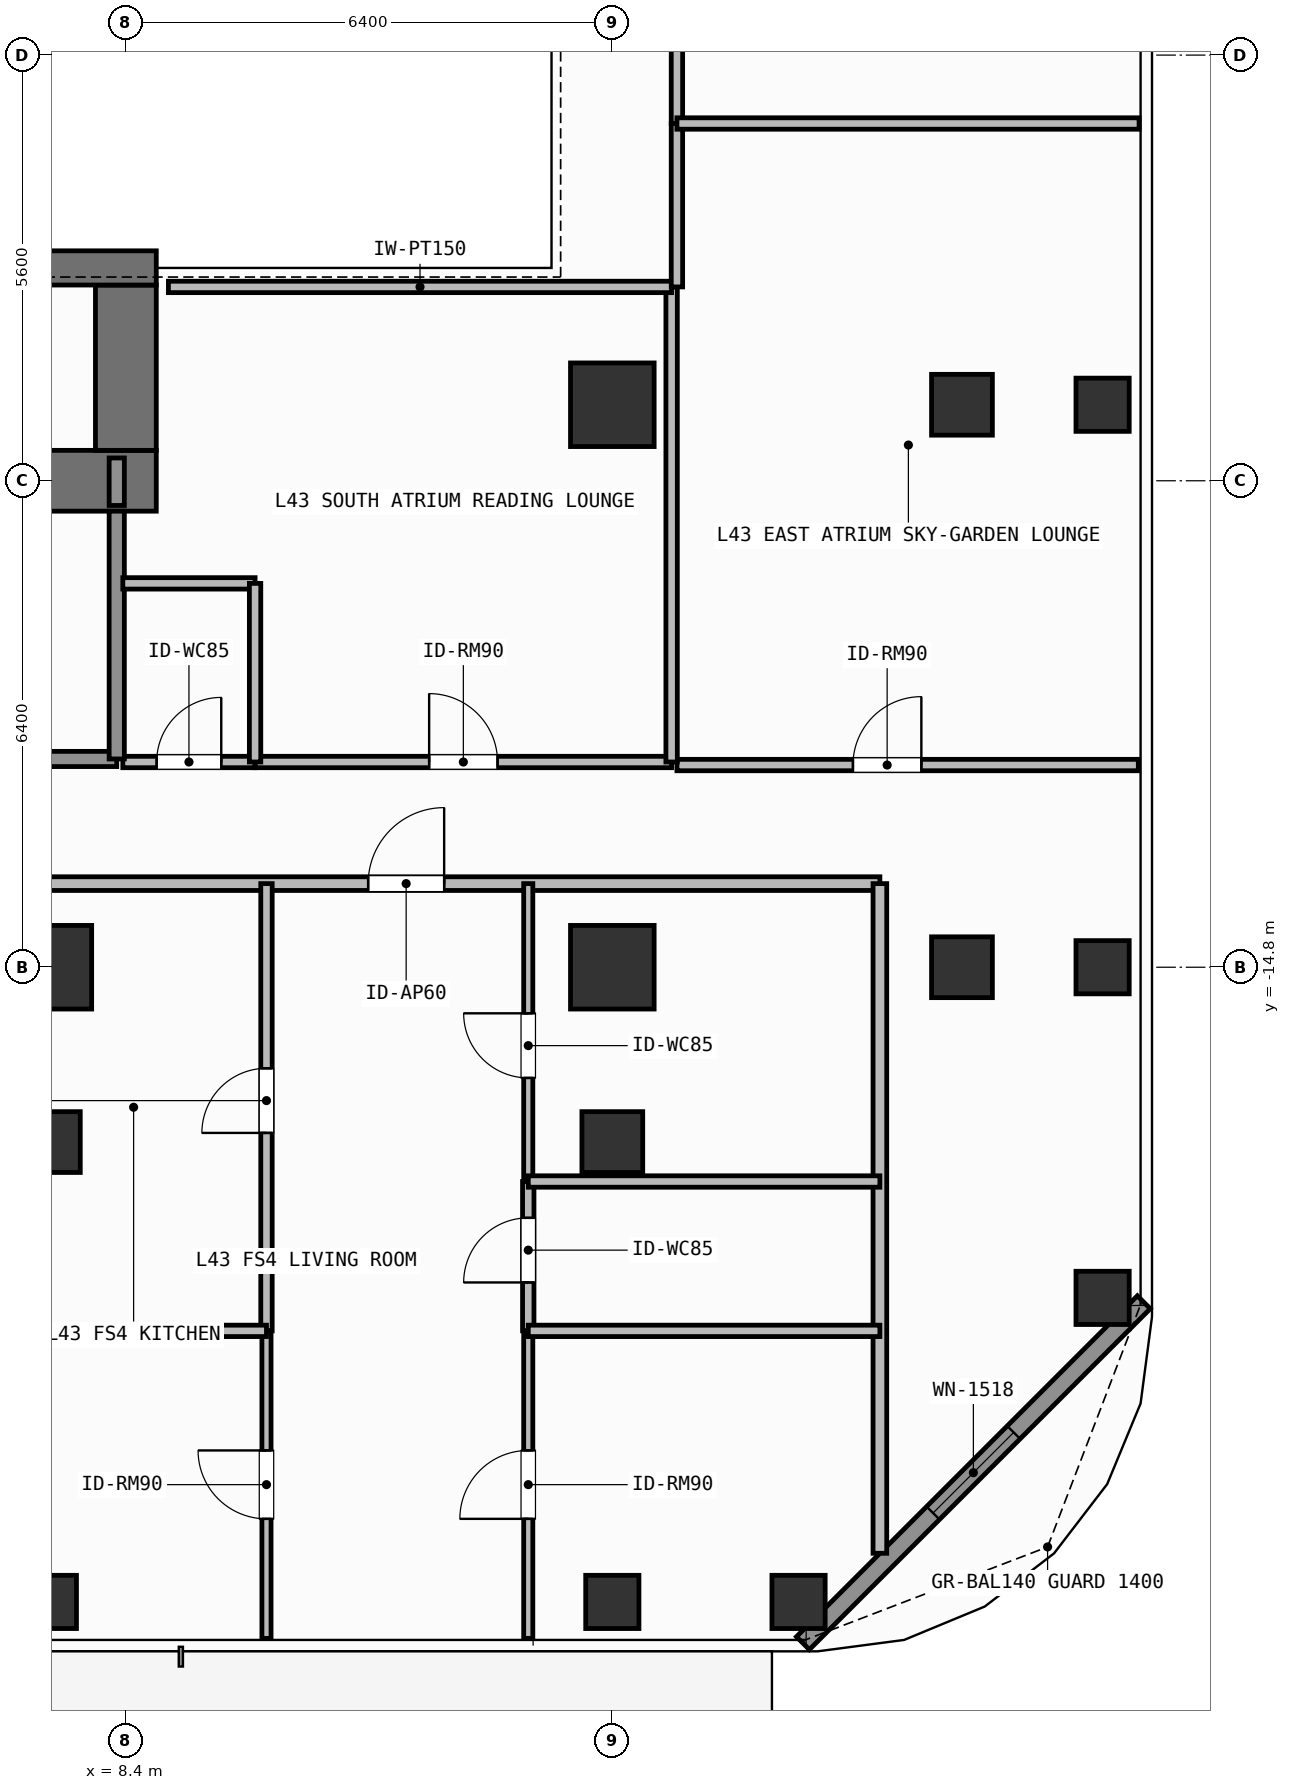
"""IFC4 building model, lengths in metres.
Left out: names, types, materials, properties, quantities, classifications, styles, units other than length and angle.
Written with IfcOpenShell. Run it as: python <this file> out.ifc"""

import sys

from ifc_helpers import new_model, si_unit, direction, frame, frame_2d, origin, origin_2d, place, context, subcontext, project, spatial, rectangle, hollow_rectangle, extrude, element, fill, save


model = new_model("IFC4")
c1 = context("Model", 3, precision=1e-05, world=origin(), true_north=direction((0.0, 1.0)))
c2 = subcontext(c1, "Body", "Model", "MODEL_VIEW")
j1 = project(units=[si_unit("LENGTHUNIT", "METRE"), si_unit("PLANEANGLEUNIT", "RADIAN")], contexts=[c1])
p1 = place(None, origin())
s1 = spatial("IfcSite", under=j1, at=p1, CompositionType="ELEMENT")
p2 = place(p1, origin())
s2 = spatial("IfcBuilding", under=s1, at=p2, CompositionType="ELEMENT")
p3 = place(p2, frame((0.0, 0.0, 175.8)))
s3 = spatial("IfcBuildingStorey", under=s2, at=p3, CompositionType="ELEMENT", Elevation=175.8)
p4 = place(p3, frame((6.12, -8.4, 0.0), z_axis=(0.0, 0.0, 1.0), x_axis=(1.0, 0.0, 0.0)))
e1 = element("IfcWall", 1, at=p4, inside=s3, PredefinedType="SHEAR", context=c2, shape_type="SweptSolid", body=[
    extrude(rectangle(XDim=2.68, YDim=0.8, at=frame_2d((1.34, 0.0))), origin(), (0.0, 0.0, 1.0), 3.9),
])
p5 = place(p3, frame((8.4, -8.0, 0.0), z_axis=(0.0, 0.0, 1.0), x_axis=(0.0, 1.0, 0.0)))
e2 = element("IfcWall", 2, at=p5, inside=s3, PredefinedType="SHEAR", context=c2, shape_type="SweptSolid", body=[
    extrude(rectangle(XDim=2.175, YDim=0.8, at=frame_2d((1.087, 0.0))), origin(), (0.0, 0.0, 1.0), 3.9),
])
p6 = place(p3, frame((3.045, -5.6, 0.0), z_axis=(0.0, 0.0, 1.0), x_axis=(1.0, 0.0, 0.0)))
e3 = element("IfcWall", 3, at=p6, inside=s3, PredefinedType="SHEAR", context=c2, shape_type="SweptSolid", body=[
    extrude(rectangle(XDim=5.755, YDim=0.45, at=frame_2d((2.877, 0.0))), origin(), (0.0, 0.0, 1.0), 3.9),
])
for number, where, z_axis, x_axis in (
    (4, (7.4, -14.8, 0.0), (0.0, 0.0, 1.0), (1.0, 0.0, 0.0)),
    (5, (14.8, -14.8, 0.0), (0.0, 0.0, 1.0), (1.0, 0.0, 0.0)),
    (6, (14.8, -7.4, 0.0), (0.0, 0.0, 1.0), (1.0, 0.0, 0.0)),
):
    element("IfcColumn", number, at=place(p3, frame(where, z_axis=z_axis, x_axis=x_axis)), inside=s3, PredefinedType="COLUMN", context=c2, shape_type="SweptSolid", body=[
        extrude(rectangle(XDim=1.1, YDim=1.1, at=origin_2d()), origin(), (0.0, 0.0, 1.0), 3.9),
    ])
for number, where, z_axis, x_axis in (
    (7, (19.4, -14.8, 0.0), (0.0, 0.0, 1.0), (1.0, 0.0, 0.0)),
    (8, (19.4, -7.4, 0.0), (0.0, 0.0, 1.0), (1.0, 0.0, 0.0)),
    (9, (7.4, -17.1, 0.0), (0.0, 0.0, 1.0), (1.0, 0.0, 0.0)),
    (10, (14.8, -17.1, 0.0), (0.0, 0.0, 1.0), (1.0, 0.0, 0.0)),
):
    element("IfcColumn", number, at=place(p3, frame(where, z_axis=z_axis, x_axis=x_axis)), inside=s3, PredefinedType="COLUMN", context=c2, shape_type="SweptSolid", body=[
        extrude(hollow_rectangle(XDim=0.8, YDim=0.8, WallThickness=0.036, at=origin_2d()), origin(), (0.0, 0.0, 1.0), 3.9),
    ])
for number, where, z_axis, x_axis in (
    (11, (17.25, -23.15, 0.0), (0.0, 0.0, 1.0), (1.0, 0.0, 0.0)),
    (12, (21.25, -19.15, 0.0), (0.0, 0.0, 1.0), (1.0, 0.0, 0.0)),
    (13, (7.4, -23.15, 0.0), (0.0, 0.0, 1.0), (1.0, 0.0, 0.0)),
    (14, (14.8, -23.15, 0.0), (0.0, 0.0, 1.0), (1.0, 0.0, 0.0)),
    (15, (21.25, -14.8, 0.0), (0.0, 0.0, 1.0), (1.0, 0.0, 0.0)),
    (16, (21.25, -7.4, 0.0), (0.0, 0.0, 1.0), (1.0, 0.0, 0.0)),
):
    element("IfcColumn", number, at=place(p3, frame(where, z_axis=z_axis, x_axis=x_axis)), inside=s3, PredefinedType="COLUMN", context=c2, shape_type="SweptSolid", body=[
        extrude(hollow_rectangle(XDim=0.7, YDim=0.7, WallThickness=0.032, at=origin_2d()), origin(), (0.0, 0.0, 1.0), 3.9),
    ])
p7 = place(p3, frame((21.792, -19.208, 0.0), z_axis=(0.0, 0.0, 1.0), x_axis=(-0.707106781187, -0.707106781187, 0.0)))
e17 = element("IfcWall", 17, at=p7, inside=s3, PredefinedType="SOLIDWALL", context=c2, shape_type="SweptSolid", body=[
    extrude(rectangle(XDim=6.343, YDim=0.24, at=frame_2d((3.171, 0.0))), origin(), (0.0, 0.0, 1.0), 3.68),
])
p8 = place(p7, frame((2.421, 0.0, 0.8)))
e18 = element("IfcOpeningElement", 18, at=p8, cuts=e17, PredefinedType="OPENING", context=c2, shape_type="SweptSolid", body=[
    extrude(rectangle(XDim=1.5, YDim=1.85, at=frame_2d((0.75, 0.925))), frame((0.0, 0.13, 0.0), z_axis=(0.0, -1.0, 0.0), x_axis=(1.0, 0.0, 0.0)), (0.0, 0.0, 1.0), 0.26),
])
p9 = place(p3, frame((4.58, -12.06, 0.0), z_axis=(0.0, 0.0, 1.0), x_axis=(1.0, 0.0, 0.0)))
e19 = element("IfcWall", 19, at=p9, inside=s3, PredefinedType="SOLIDWALL", context=c2, shape_type="SweptSolid", body=[
    extrude(rectangle(XDim=3.7, YDim=0.2, at=frame_2d((1.85, 0.0))), origin(), (0.0, 0.0, 1.0), 3.68),
])
p10 = place(p9, frame((1.212, 0.0, 0.0)))
e20 = element("IfcOpeningElement", 20, at=p10, cuts=e19, PredefinedType="OPENING", context=c2, shape_type="SweptSolid", body=[
    extrude(rectangle(XDim=1.1, YDim=2.15, at=frame_2d((0.55, 1.075))), frame((0.0, 0.11, 0.0), z_axis=(0.0, -1.0, 0.0), x_axis=(1.0, 0.0, 0.0)), (0.0, 0.0, 1.0), 0.22),
])
p11 = place(p3, frame((8.36, -12.1, 0.0), z_axis=(0.0, 0.0, 1.0), x_axis=(1.0, 0.0, 0.0)))
e21 = element("IfcWall", 21, at=p11, inside=s3, PredefinedType="PARTITIONING", context=c2, shape_type="SweptSolid", body=[
    extrude(rectangle(XDim=1.74, YDim=0.15, at=frame_2d((0.87, 0.0))), origin(), (0.0, 0.0, 1.0), 3.68),
])
p12 = place(p11, frame((0.445, 0.0, 0.0)))
e22 = element("IfcOpeningElement", 22, at=p12, cuts=e21, PredefinedType="OPENING", context=c2, shape_type="SweptSolid", body=[
    extrude(rectangle(XDim=0.85, YDim=2.1, at=frame_2d((0.425, 1.05))), frame((0.0, 0.085, 0.0), z_axis=(0.0, -1.0, 0.0), x_axis=(1.0, 0.0, 0.0)), (0.0, 0.0, 1.0), 0.17),
])
p13 = place(p3, frame((10.1, -12.1, 0.0), z_axis=(0.0, 0.0, 1.0), x_axis=(1.0, 0.0, 0.0)))
e23 = element("IfcWall", 23, at=p13, inside=s3, PredefinedType="PARTITIONING", context=c2, shape_type="SweptSolid", body=[
    extrude(rectangle(XDim=5.48, YDim=0.15, at=frame_2d((2.74, 0.0))), origin(), (0.0, 0.0, 1.0), 3.68),
])
p14 = place(p13, frame((2.29, 0.0, 0.0)))
e24 = element("IfcOpeningElement", 24, at=p14, cuts=e23, PredefinedType="OPENING", context=c2, shape_type="SweptSolid", body=[
    extrude(rectangle(XDim=0.9, YDim=2.1, at=frame_2d((0.45, 1.05))), frame((0.0, 0.085, 0.0), z_axis=(0.0, -1.0, 0.0), x_axis=(1.0, 0.0, 0.0)), (0.0, 0.0, 1.0), 0.17),
])
p15 = place(p3, frame((6.754, -13.7, 0.0), z_axis=(0.0, 0.0, 1.0), x_axis=(1.0, 0.0, 0.0)))
e25 = element("IfcWall", 25, at=p15, inside=s3, PredefinedType="PARTITIONING", context=c2, shape_type="SweptSolid", body=[
    extrude(rectangle(XDim=11.566, YDim=0.18, at=frame_2d((5.783, 0.0))), origin(), (0.0, 0.0, 1.0), 3.68),
])
p16 = place(p15, frame((4.833, 0.0, 0.0)))
e26 = element("IfcOpeningElement", 26, at=p16, cuts=e25, PredefinedType="OPENING", context=c2, shape_type="SweptSolid", body=[
    extrude(rectangle(XDim=1.0, YDim=2.2, at=frame_2d((0.5, 1.1))), frame((0.0, 0.1, 0.0), z_axis=(0.0, -1.0, 0.0), x_axis=(1.0, 0.0, 0.0)), (0.0, 0.0, 1.0), 0.2),
])
p17 = place(p3, frame((10.25, -19.584, 0.0), z_axis=(0.0, 0.0, 1.0), x_axis=(0.0, 1.0, 0.0)))
e27 = element("IfcWall", 27, at=p17, inside=s3, PredefinedType="PARTITIONING", context=c2, shape_type="SweptSolid", body=[
    extrude(rectangle(XDim=5.884, YDim=0.15, at=frame_2d((2.942, 0.0))), origin(), (0.0, 0.0, 1.0), 3.68),
])
p18 = place(p17, frame((2.604, 0.0, 0.0)))
e28 = element("IfcOpeningElement", 28, at=p18, cuts=e27, PredefinedType="OPENING", context=c2, shape_type="SweptSolid", body=[
    extrude(rectangle(XDim=0.85, YDim=2.1, at=frame_2d((0.425, 1.05))), frame((0.0, 0.085, 0.0), z_axis=(0.0, -1.0, 0.0), x_axis=(1.0, 0.0, 0.0)), (0.0, 0.0, 1.0), 0.17),
])
p19 = place(p3, frame((10.25, -23.63, 0.0), z_axis=(0.0, 0.0, 1.0), x_axis=(0.0, 1.0, 0.0)))
e29 = element("IfcWall", 29, at=p19, inside=s3, PredefinedType="PARTITIONING", context=c2, shape_type="SweptSolid", body=[
    extrude(rectangle(XDim=4.046, YDim=0.12, at=frame_2d((2.023, 0.0))), origin(), (0.0, 0.0, 1.0), 3.68),
])
p20 = place(p19, frame((1.573, 0.0, 0.0)))
e30 = element("IfcOpeningElement", 30, at=p20, cuts=e29, PredefinedType="OPENING", context=c2, shape_type="SweptSolid", body=[
    extrude(rectangle(XDim=0.9, YDim=2.1, at=frame_2d((0.45, 1.05))), frame((0.0, 0.07, 0.0), z_axis=(0.0, -1.0, 0.0), x_axis=(1.0, 0.0, 0.0)), (0.0, 0.0, 1.0), 0.14),
])
p21 = place(p3, frame((13.694, -19.584, 0.0), z_axis=(0.0, 0.0, 1.0), x_axis=(0.0, 1.0, 0.0)))
e31 = element("IfcWall", 31, at=p21, inside=s3, PredefinedType="PARTITIONING", context=c2, shape_type="SweptSolid", body=[
    extrude(rectangle(XDim=1.965, YDim=0.15, at=frame_2d((0.982, 0.0))), origin(), (0.0, 0.0, 1.0), 3.68),
])
p22 = place(p21, frame((0.637, 0.0, 0.0)))
e32 = element("IfcOpeningElement", 32, at=p22, cuts=e31, PredefinedType="OPENING", context=c2, shape_type="SweptSolid", body=[
    extrude(rectangle(XDim=0.85, YDim=2.1, at=frame_2d((0.425, 1.05))), frame((0.0, 0.085, 0.0), z_axis=(0.0, -1.0, 0.0), x_axis=(1.0, 0.0, 0.0)), (0.0, 0.0, 1.0), 0.17),
])
p23 = place(p3, frame((13.694, -17.619, 0.0), z_axis=(0.0, 0.0, 1.0), x_axis=(0.0, 1.0, 0.0)))
e33 = element("IfcWall", 33, at=p23, inside=s3, PredefinedType="PARTITIONING", context=c2, shape_type="SweptSolid", body=[
    extrude(rectangle(XDim=3.919, YDim=0.12, at=frame_2d((1.959, 0.0))), origin(), (0.0, 0.0, 1.0), 3.68),
])
p24 = place(p23, frame((1.363, 0.0, 0.0)))
e34 = element("IfcOpeningElement", 34, at=p24, cuts=e33, PredefinedType="OPENING", context=c2, shape_type="SweptSolid", body=[
    extrude(rectangle(XDim=0.85, YDim=2.1, at=frame_2d((0.425, 1.05))), frame((0.0, 0.07, 0.0), z_axis=(0.0, -1.0, 0.0), x_axis=(1.0, 0.0, 0.0)), (0.0, 0.0, 1.0), 0.14),
])
p25 = place(p3, frame((13.694, -23.63, 0.0), z_axis=(0.0, 0.0, 1.0), x_axis=(0.0, 1.0, 0.0)))
e35 = element("IfcWall", 35, at=p25, inside=s3, PredefinedType="PARTITIONING", context=c2, shape_type="SweptSolid", body=[
    extrude(rectangle(XDim=4.046, YDim=0.12, at=frame_2d((2.023, 0.0))), origin(), (0.0, 0.0, 1.0), 3.68),
])
p26 = place(p25, frame((1.573, 0.0, 0.0)))
e36 = element("IfcOpeningElement", 36, at=p26, cuts=e35, PredefinedType="OPENING", context=c2, shape_type="SweptSolid", body=[
    extrude(rectangle(XDim=0.9, YDim=2.1, at=frame_2d((0.45, 1.05))), frame((0.0, 0.07, 0.0), z_axis=(0.0, -1.0, 0.0), x_axis=(1.0, 0.0, 0.0)), (0.0, 0.0, 1.0), 0.14),
])
p27 = place(p3, frame((15.65, -12.14, 0.0), z_axis=(0.0, 0.0, 1.0), x_axis=(1.0, 0.0, 0.0)))
e37 = element("IfcWall", 37, at=p27, inside=s3, PredefinedType="PARTITIONING", context=c2, shape_type="SweptSolid", body=[
    extrude(rectangle(XDim=6.07, YDim=0.15, at=frame_2d((3.035, 0.0))), origin(), (0.0, 0.0, 1.0), 3.68),
])
p28 = place(p27, frame((2.316, 0.0, 0.0)))
e38 = element("IfcOpeningElement", 38, at=p28, cuts=e37, PredefinedType="OPENING", context=c2, shape_type="SweptSolid", body=[
    extrude(rectangle(XDim=0.9, YDim=2.1, at=frame_2d((0.45, 1.05))), frame((0.0, 0.085, 0.0), z_axis=(0.0, -1.0, 0.0), x_axis=(1.0, 0.0, 0.0)), (0.0, 0.0, 1.0), 0.17),
])
p29 = place(p3, frame((8.28, -12.06, 0.0), z_axis=(0.0, 0.0, 1.0), x_axis=(0.0, 1.0, 0.0)))
e39 = element("IfcWall", 39, at=p29, inside=s3, PredefinedType="SOLIDWALL", context=c2, shape_type="SweptSolid", body=[
    extrude(rectangle(XDim=3.26, YDim=0.2, at=frame_2d((1.63, 0.0))), origin(), (0.0, 0.0, 1.0), 3.68),
])
p30 = place(p3, frame((8.28, -8.725, 0.0), z_axis=(0.0, 0.0, 1.0), x_axis=(0.0, 1.0, 0.0)))
e40 = element("IfcWall", 40, at=p30, inside=s3, PredefinedType="SOLIDWALL", context=c2, shape_type="SweptSolid", body=[
    extrude(rectangle(XDim=0.625, YDim=0.2, at=frame_2d((0.312, 0.0))), origin(), (0.0, 0.0, 1.0), 3.68),
])
p31 = place(p3, frame((8.36, -9.75, 0.0), z_axis=(0.0, 0.0, 1.0), x_axis=(1.0, 0.0, 0.0)))
e41 = element("IfcWall", 41, at=p31, inside=s3, PredefinedType="PARTITIONING", context=c2, shape_type="SweptSolid", body=[
    extrude(rectangle(XDim=1.74, YDim=0.15, at=frame_2d((0.87, 0.0))), origin(), (0.0, 0.0, 1.0), 3.68),
])
p32 = place(p3, frame((10.1, -12.1, 0.0), z_axis=(0.0, 0.0, 1.0), x_axis=(0.0, 1.0, 0.0)))
e42 = element("IfcWall", 42, at=p32, inside=s3, PredefinedType="PARTITIONING", context=c2, shape_type="SweptSolid", body=[
    extrude(rectangle(XDim=2.35, YDim=0.15, at=frame_2d((1.175, 0.0))), origin(), (0.0, 0.0, 1.0), 3.68),
])
p33 = place(p3, frame((15.58, -12.1, 0.0), z_axis=(0.0, 0.0, 1.0), x_axis=(0.0, 1.0, 0.0)))
e43 = element("IfcWall", 43, at=p33, inside=s3, PredefinedType="PARTITIONING", context=c2, shape_type="SweptSolid", body=[
    extrude(rectangle(XDim=6.25, YDim=0.15, at=frame_2d((3.125, 0.0))), origin(), (0.0, 0.0, 1.0), 3.68),
])
p34 = place(p3, frame((8.96, -5.85, 0.0), z_axis=(0.0, 0.0, 1.0), x_axis=(1.0, 0.0, 0.0)))
e44 = element("IfcWall", 44, at=p34, inside=s3, PredefinedType="PARTITIONING", context=c2, shape_type="SweptSolid", body=[
    extrude(rectangle(XDim=6.62, YDim=0.15, at=frame_2d((3.31, 0.0))), origin(), (0.0, 0.0, 1.0), 3.68),
])
p35 = place(p3, frame((18.32, -22.51, 0.0), z_axis=(0.0, 0.0, 1.0), x_axis=(0.0, 1.0, 0.0)))
e45 = element("IfcWall", 45, at=p35, inside=s3, PredefinedType="PARTITIONING", context=c2, shape_type="SweptSolid", body=[
    extrude(rectangle(XDim=8.81, YDim=0.18, at=frame_2d((4.405, 0.0))), origin(), (0.0, 0.0, 1.0), 3.68),
])
p36 = place(p3, frame((6.754, -19.584, 0.0), z_axis=(0.0, 0.0, 1.0), x_axis=(1.0, 0.0, 0.0)))
e46 = element("IfcWall", 46, at=p36, inside=s3, PredefinedType="PARTITIONING", context=c2, shape_type="SweptSolid", body=[
    extrude(rectangle(XDim=3.496, YDim=0.15, at=frame_2d((1.748, 0.0))), origin(), (0.0, 0.0, 1.0), 3.68),
])
for number, where, z_axis, x_axis in (
    (47, (13.694, -17.619, 0.0), (0.0, 0.0, 1.0), (1.0, 0.0, 0.0)),
    (48, (13.694, -19.584, 0.0), (0.0, 0.0, 1.0), (1.0, 0.0, 0.0)),
):
    element("IfcWall", number, at=place(p3, frame(where, z_axis=z_axis, x_axis=x_axis)), inside=s3, PredefinedType="PARTITIONING", context=c2, shape_type="SweptSolid", body=[
        extrude(rectangle(XDim=4.626, YDim=0.15, at=frame_2d((2.313, 0.0))), origin(), (0.0, 0.0, 1.0), 3.68),
    ])
p37 = place(p3, frame((15.65, -5.85, 0.0), z_axis=(0.0, 0.0, 1.0), x_axis=(0.0, 1.0, 0.0)))
e49 = element("IfcWall", 49, at=p37, inside=s3, PredefinedType="PARTITIONING", context=c2, shape_type="SweptSolid", body=[
    extrude(rectangle(XDim=2.15, YDim=0.15, at=frame_2d((1.075, 0.0))), origin(), (0.0, 0.0, 1.0), 3.68),
])
p38 = place(p3, frame((15.65, -3.7, 0.0), z_axis=(0.0, 0.0, 1.0), x_axis=(0.0, 1.0, 0.0)))
e50 = element("IfcWall", 50, at=p38, inside=s3, PredefinedType="PARTITIONING", context=c2, shape_type="SweptSolid", body=[
    extrude(rectangle(XDim=9.55, YDim=0.15, at=frame_2d((4.775, 0.0))), origin(), (0.0, 0.0, 1.0), 3.68),
])
p39 = place(p3, frame((15.65, -3.7, 0.0), z_axis=(0.0, 0.0, 1.0), x_axis=(1.0, 0.0, 0.0)))
e51 = element("IfcWall", 51, at=p39, inside=s3, PredefinedType="PARTITIONING", context=c2, shape_type="SweptSolid", body=[
    extrude(rectangle(XDim=6.08, YDim=0.15, at=frame_2d((3.04, 0.0))), origin(), (0.0, 0.0, 1.0), 3.68),
])
p40 = place(p8, origin())
e52 = element("IfcWindow", 52, at=p40, inside=s3, PartitioningType="SINGLE_PANEL", PredefinedType="WINDOW", context=c2, shape_type="SweptSolid", body=[
    extrude(rectangle(XDim=1.5, YDim=1.85, at=frame_2d((0.75, 0.925))), frame((0.0, 0.03, 0.0), z_axis=(0.0, -1.0, 0.0), x_axis=(1.0, 0.0, 0.0)), (0.0, 0.0, 1.0), 0.06),
])
fill(e18, e52)
p41 = place(p12, origin())
e53 = element("IfcDoor", 53, at=p41, inside=s3, OperationType="SINGLE_SWING_RIGHT", PredefinedType="DOOR", context=c2, shape_type="SweptSolid", body=[
    extrude(rectangle(XDim=0.85, YDim=2.1, at=frame_2d((0.425, 1.05))), frame((0.0, 0.025, 0.0), z_axis=(0.0, -1.0, 0.0), x_axis=(1.0, 0.0, 0.0)), (0.0, 0.0, 1.0), 0.05),
])
fill(e22, e53)
p42 = place(p14, origin())
e54 = element("IfcDoor", 54, at=p42, inside=s3, OperationType="SINGLE_SWING_LEFT", PredefinedType="DOOR", context=c2, shape_type="SweptSolid", body=[
    extrude(rectangle(XDim=0.9, YDim=2.1, at=frame_2d((0.45, 1.05))), frame((0.0, 0.025, 0.0), z_axis=(0.0, -1.0, 0.0), x_axis=(1.0, 0.0, 0.0)), (0.0, 0.0, 1.0), 0.05),
])
fill(e24, e54)
p43 = place(p16, origin())
e55 = element("IfcDoor", 55, at=p43, inside=s3, OperationType="SINGLE_SWING_RIGHT", PredefinedType="DOOR", context=c2, shape_type="SweptSolid", body=[
    extrude(rectangle(XDim=1.0, YDim=2.2, at=frame_2d((0.5, 1.1))), frame((0.0, 0.025, 0.0), z_axis=(0.0, -1.0, 0.0), x_axis=(1.0, 0.0, 0.0)), (0.0, 0.0, 1.0), 0.05),
])
fill(e26, e55)
p44 = place(p18, origin())
e56 = element("IfcDoor", 56, at=p44, inside=s3, OperationType="SINGLE_SWING_LEFT", PredefinedType="DOOR", context=c2, shape_type="SweptSolid", body=[
    extrude(rectangle(XDim=0.85, YDim=2.1, at=frame_2d((0.425, 1.05))), frame((0.0, 0.025, 0.0), z_axis=(0.0, -1.0, 0.0), x_axis=(1.0, 0.0, 0.0)), (0.0, 0.0, 1.0), 0.05),
])
fill(e28, e56)
p45 = place(p20, origin())
e57 = element("IfcDoor", 57, at=p45, inside=s3, OperationType="SINGLE_SWING_RIGHT", PredefinedType="DOOR", context=c2, shape_type="SweptSolid", body=[
    extrude(rectangle(XDim=0.9, YDim=2.1, at=frame_2d((0.45, 1.05))), frame((0.0, 0.025, 0.0), z_axis=(0.0, -1.0, 0.0), x_axis=(1.0, 0.0, 0.0)), (0.0, 0.0, 1.0), 0.05),
])
fill(e30, e57)
p46 = place(p22, origin())
e58 = element("IfcDoor", 58, at=p46, inside=s3, OperationType="SINGLE_SWING_LEFT", PredefinedType="DOOR", context=c2, shape_type="SweptSolid", body=[
    extrude(rectangle(XDim=0.85, YDim=2.1, at=frame_2d((0.425, 1.05))), frame((0.0, 0.025, 0.0), z_axis=(0.0, -1.0, 0.0), x_axis=(1.0, 0.0, 0.0)), (0.0, 0.0, 1.0), 0.05),
])
fill(e32, e58)
p47 = place(p24, origin())
e59 = element("IfcDoor", 59, at=p47, inside=s3, OperationType="SINGLE_SWING_RIGHT", PredefinedType="DOOR", context=c2, shape_type="SweptSolid", body=[
    extrude(rectangle(XDim=0.85, YDim=2.1, at=frame_2d((0.425, 1.05))), frame((0.0, 0.025, 0.0), z_axis=(0.0, -1.0, 0.0), x_axis=(1.0, 0.0, 0.0)), (0.0, 0.0, 1.0), 0.05),
])
fill(e34, e59)
p48 = place(p26, origin())
e60 = element("IfcDoor", 60, at=p48, inside=s3, OperationType="SINGLE_SWING_LEFT", PredefinedType="DOOR", context=c2, shape_type="SweptSolid", body=[
    extrude(rectangle(XDim=0.9, YDim=2.1, at=frame_2d((0.45, 1.05))), frame((0.0, 0.025, 0.0), z_axis=(0.0, -1.0, 0.0), x_axis=(1.0, 0.0, 0.0)), (0.0, 0.0, 1.0), 0.05),
])
fill(e36, e60)
p49 = place(p28, origin())
e61 = element("IfcDoor", 61, at=p49, inside=s3, OperationType="SINGLE_SWING_RIGHT", PredefinedType="DOOR", context=c2, shape_type="SweptSolid", body=[
    extrude(rectangle(XDim=0.9, YDim=2.1, at=frame_2d((0.45, 1.05))), frame((0.0, 0.025, 0.0), z_axis=(0.0, -1.0, 0.0), x_axis=(1.0, 0.0, 0.0)), (0.0, 0.0, 1.0), 0.05),
])
fill(e38, e61)
save(model, sys.argv[1])
